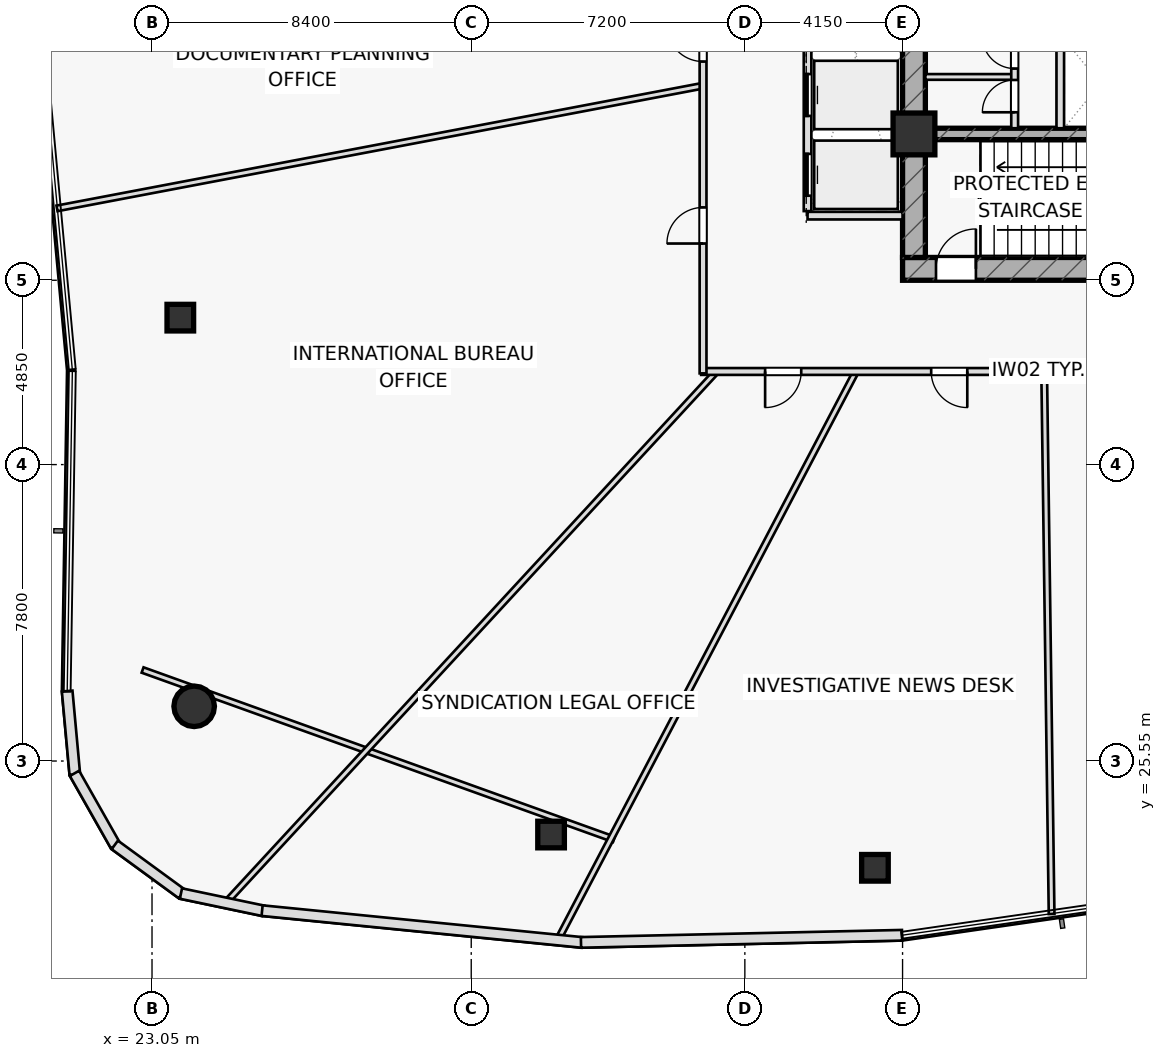
"""IFC4 building model, lengths in metres.
Left out: names, types, materials, properties, quantities, classifications, styles, units other than length and angle.
Written with IfcOpenShell. Run it as: python <this file> out.ifc"""

import sys

from ifc_helpers import new_model, si_unit, direction, frame, frame_2d, origin, origin_2d, place, context, subcontext, project, spatial, rectangle, hollow_rectangle, hollow_circle, extrude, element, fill, save


model = new_model("IFC4")
c1 = context("Model", 3, precision=1e-05, world=origin(), true_north=direction((0.0, 1.0)))
c2 = subcontext(c1, "Body", "Model", "MODEL_VIEW")
j1 = project(units=[si_unit("LENGTHUNIT", "METRE"), si_unit("PLANEANGLEUNIT", "RADIAN")], contexts=[c1])
p1 = place(None, origin())
s1 = spatial("IfcSite", under=j1, at=p1, CompositionType="ELEMENT")
p2 = place(p1, origin())
s2 = spatial("IfcBuilding", under=s1, at=p2, CompositionType="ELEMENT")
p3 = place(p2, frame((0.0, 0.0, 74.4)))
s3 = spatial("IfcBuildingStorey", under=s2, at=p3, CompositionType="ELEMENT", Elevation=74.4)
p4 = place(p3, frame((42.8, 38.5, 0.0), z_axis=(0.0, 0.0, 1.0), x_axis=(1.0, 0.0, 0.0)))
e1 = element("IfcWall", 1, at=p4, inside=s3, PredefinedType="SHEAR", context=c2, shape_type="SweptSolid", body=[
    extrude(rectangle(XDim=14.4, YDim=0.6, at=frame_2d((7.2, 0.0))), origin(), (0.0, 0.0, 1.0), 3.6),
])
p5 = place(p4, frame((0.88, 0.0, 0.0)))
e2 = element("IfcOpeningElement", 2, at=p5, cuts=e1, PredefinedType="OPENING", context=c2, shape_type="SweptSolid", body=[
    extrude(rectangle(XDim=1.05, YDim=2.2, at=frame_2d((0.525, 1.1))), frame((0.0, 0.31, 0.0), z_axis=(0.0, -1.0, 0.0), x_axis=(1.0, 0.0, 0.0)), (0.0, 0.0, 1.0), 0.62),
])
p6 = place(p3, frame((43.1, 38.8, 0.0), z_axis=(0.0, 0.0, 1.0), x_axis=(0.0, 1.0, 0.0)))
e3 = element("IfcWall", 3, at=p6, inside=s3, PredefinedType="SHEAR", context=c2, shape_type="SweptSolid", body=[
    extrude(rectangle(XDim=12.4, YDim=0.6, at=frame_2d((6.2, 0.0))), origin(), (0.0, 0.0, 1.0), 3.6),
])
p7 = place(p3, frame((43.4, 42.05, 0.0), z_axis=(0.0, 0.0, 1.0), x_axis=(1.0, 0.0, 0.0)))
e4 = element("IfcWall", 4, at=p7, inside=s3, PredefinedType="SHEAR", context=c2, shape_type="SweptSolid", body=[
    extrude(rectangle(XDim=13.2, YDim=0.3, at=frame_2d((6.6, 0.0))), origin(), (0.0, 0.0, 1.0), 3.6),
])
p8 = place(p3, frame((43.1, 42.05, 0.0), z_axis=(0.0, 0.0, 1.0), x_axis=(1.0, 0.0, 0.0)))
e5 = element("IfcColumn", 5, at=p8, inside=s3, PredefinedType="COLUMN", context=c2, shape_type="SweptSolid", body=[
    extrude(rectangle(XDim=1.1, YDim=1.1, at=origin_2d()), origin(), (0.0, 0.0, 1.0), 3.6),
])
p9 = place(p3, frame((23.795, 37.216, 0.0), z_axis=(0.0, 0.0, 1.0), x_axis=(1.0, 0.0, 0.0)))
e6 = element("IfcColumn", 6, at=p9, inside=s3, PredefinedType="COLUMN", context=c2, shape_type="SweptSolid", body=[
    extrude(hollow_rectangle(XDim=0.7, YDim=0.7, WallThickness=0.04, at=origin_2d()), origin(), (0.0, 0.0, 1.0), 3.6),
])
p10 = place(p3, frame((24.159, 26.99, 0.0), z_axis=(0.0, 0.0, 1.0), x_axis=(1.0, 0.0, 0.0)))
e7 = element("IfcColumn", 7, at=p10, inside=s3, PredefinedType="COLUMN", context=c2, shape_type="SweptSolid", body=[
    extrude(hollow_circle(Radius=0.533, WallThickness=0.045, at=origin_2d()), origin(), (0.0, 0.0, 1.0), 3.6),
])
for number, where, z_axis, x_axis in (
    (8, (33.551, 23.615, 0.0), (0.0, 0.0, 1.0), (1.0, 0.0, 0.0)),
    (9, (42.073, 22.74, 0.0), (0.0, 0.0, 1.0), (1.0, 0.0, 0.0)),
):
    element("IfcColumn", number, at=place(p3, frame(where, z_axis=z_axis, x_axis=x_axis)), inside=s3, PredefinedType="COLUMN", context=c2, shape_type="SweptSolid", body=[
        extrude(hollow_rectangle(XDim=0.7, YDim=0.7, WallThickness=0.04, at=origin_2d()), origin(), (0.0, 0.0, 1.0), 3.6),
    ])
p11 = place(p3, frame((40.3, 39.9, 0.0), z_axis=(0.0, 0.0, 1.0), x_axis=(1.0, 0.0, 0.0)))
e10 = element("IfcWall", 10, at=p11, inside=s3, PredefinedType="PARTITIONING", context=c2, shape_type="SweptSolid", body=[
    extrude(rectangle(XDim=2.5, YDim=0.2, at=frame_2d((1.25, 0.0))), origin(), (0.0, 0.0, 1.0), 3.6),
])
p12 = place(p3, frame((46.95, 42.2, 0.0), z_axis=(0.0, 0.0, 1.0), x_axis=(0.0, 1.0, 0.0)))
e11 = element("IfcWall", 11, at=p12, inside=s3, PredefinedType="PARTITIONING", context=c2, shape_type="SweptSolid", body=[
    extrude(rectangle(XDim=2.4, YDim=0.2, at=frame_2d((1.2, 0.0))), origin(), (0.0, 0.0, 1.0), 3.6),
])
p13 = place(p3, frame((43.4, 43.55, 0.0), z_axis=(0.0, 0.0, 1.0), x_axis=(1.0, 0.0, 0.0)))
e12 = element("IfcWall", 12, at=p13, inside=s3, PredefinedType="PARTITIONING", context=c2, shape_type="SweptSolid", body=[
    extrude(rectangle(XDim=2.35, YDim=0.15, at=frame_2d((1.175, 0.0))), origin(), (0.0, 0.0, 1.0), 3.6),
])
p14 = place(p3, frame((45.75, 42.2, 0.0), z_axis=(0.0, 0.0, 1.0), x_axis=(0.0, 1.0, 0.0)))
e13 = element("IfcWall", 13, at=p14, inside=s3, PredefinedType="PARTITIONING", context=c2, shape_type="SweptSolid", body=[
    extrude(rectangle(XDim=5.6, YDim=0.18, at=frame_2d((2.8, 0.0))), origin(), (0.0, 0.0, 1.0), 3.6),
])
p15 = place(p14, frame((0.42, 0.0, 0.0)))
e14 = element("IfcOpeningElement", 14, at=p15, cuts=e13, PredefinedType="OPENING", context=c2, shape_type="SweptSolid", body=[
    extrude(rectangle(XDim=0.85, YDim=2.05, at=frame_2d((0.425, 1.025))), frame((0.0, 0.1, 0.0), z_axis=(0.0, -1.0, 0.0), x_axis=(1.0, 0.0, 0.0)), (0.0, 0.0, 1.0), 0.2),
])
p16 = place(p14, frame((1.57, 0.0, 0.0)))
e15 = element("IfcOpeningElement", 15, at=p16, cuts=e13, PredefinedType="OPENING", context=c2, shape_type="SweptSolid", body=[
    extrude(rectangle(XDim=0.85, YDim=2.05, at=frame_2d((0.425, 1.025))), frame((0.0, 0.1, 0.0), z_axis=(0.0, -1.0, 0.0), x_axis=(1.0, 0.0, 0.0)), (0.0, 0.0, 1.0), 0.2),
])
p17 = place(p14, frame((2.8, 0.0, 0.0)))
e16 = element("IfcOpeningElement", 16, at=p17, cuts=e13, PredefinedType="OPENING", context=c2, shape_type="SweptSolid", body=[
    extrude(rectangle(XDim=0.9, YDim=2.05, at=frame_2d((0.45, 1.025))), frame((0.0, 0.1, 0.0), z_axis=(0.0, -1.0, 0.0), x_axis=(1.0, 0.0, 0.0)), (0.0, 0.0, 1.0), 0.2),
])
p18 = place(p3, frame((22.802, 27.945, 0.0), z_axis=(0.0, 0.0, 1.0), x_axis=(0.941102349209, -0.338121824662, 0.0)))
e17 = element("IfcWall", 17, at=p18, inside=s3, PredefinedType="PARTITIONING", context=c2, shape_type="SweptSolid", body=[
    extrude(rectangle(XDim=13.18, YDim=0.15, at=frame_2d((6.59, 0.0))), origin(), (0.0, 0.0, 1.0), 2.975),
])
p19 = place(p3, frame((37.55, 43.319, 0.0), z_axis=(0.0, 0.0, 1.0), x_axis=(-0.98244116135, -0.186572678831, 0.0)))
e18 = element("IfcWall", 18, at=p19, inside=s3, PredefinedType="PARTITIONING", context=c2, shape_type="SweptSolid", body=[
    extrude(rectangle(XDim=17.304, YDim=0.15, at=frame_2d((8.652, 0.0))), origin(), (0.0, 0.0, 1.0), 3.025),
])
p20 = place(p3, frame((37.903, 35.8, 0.0), z_axis=(0.0, 0.0, 1.0), x_axis=(-0.678485038422, -0.73461422028, 0.0)))
e19 = element("IfcWall", 19, at=p20, inside=s3, PredefinedType="PARTITIONING", context=c2, shape_type="SweptSolid", body=[
    extrude(rectangle(XDim=19.047, YDim=0.15, at=frame_2d((9.523, 0.0))), origin(), (0.0, 0.0, 1.0), 2.975),
])
p21 = place(p3, frame((41.575, 35.8, 0.0), z_axis=(0.0, 0.0, 1.0), x_axis=(-0.464501273873, -0.885572451339, 0.0)))
e20 = element("IfcWall", 20, at=p21, inside=s3, PredefinedType="PARTITIONING", context=c2, shape_type="SweptSolid", body=[
    extrude(rectangle(XDim=16.904, YDim=0.15, at=frame_2d((8.452, 0.0))), origin(), (0.0, 0.0, 1.0), 2.975),
])
p22 = place(p3, frame((46.526, 35.8, 0.0), z_axis=(0.0, 0.0, 1.0), x_axis=(0.013697579238, -0.999906183761, 0.0)))
e21 = element("IfcWall", 21, at=p22, inside=s3, PredefinedType="PARTITIONING", context=c2, shape_type="SweptSolid", body=[
    extrude(rectangle(XDim=14.277, YDim=0.15, at=frame_2d((7.138, 0.0))), origin(), (0.0, 0.0, 1.0), 2.975),
])
p23 = place(p3, frame((59.65, 35.8, 0.0), z_axis=(0.0, 0.0, 1.0), x_axis=(-1.0, 0.0, 0.0)))
e22 = element("IfcWall", 22, at=p23, inside=s3, PredefinedType="PARTITIONING", context=c2, shape_type="SweptSolid", body=[
    extrude(rectangle(XDim=22.15, YDim=0.18, at=frame_2d((11.075, 0.0))), origin(), (0.0, 0.0, 1.0), 2.975),
])
p24 = place(p23, frame((1.911, 0.0, 0.0)))
e23 = element("IfcOpeningElement", 23, at=p24, cuts=e22, PredefinedType="OPENING", context=c2, shape_type="SweptSolid", body=[
    extrude(rectangle(XDim=0.95, YDim=2.05, at=frame_2d((0.475, 1.025))), frame((0.0, 0.1, 0.0), z_axis=(0.0, -1.0, 0.0), x_axis=(1.0, 0.0, 0.0)), (0.0, 0.0, 1.0), 0.2),
])
p25 = place(p23, frame((8.314, 0.0, 0.0)))
e24 = element("IfcOpeningElement", 24, at=p25, cuts=e22, PredefinedType="OPENING", context=c2, shape_type="SweptSolid", body=[
    extrude(rectangle(XDim=0.95, YDim=2.05, at=frame_2d((0.475, 1.025))), frame((0.0, 0.1, 0.0), z_axis=(0.0, -1.0, 0.0), x_axis=(1.0, 0.0, 0.0)), (0.0, 0.0, 1.0), 0.2),
])
p26 = place(p23, frame((15.147, 0.0, 0.0)))
e25 = element("IfcOpeningElement", 25, at=p26, cuts=e22, PredefinedType="OPENING", context=c2, shape_type="SweptSolid", body=[
    extrude(rectangle(XDim=0.95, YDim=2.05, at=frame_2d((0.475, 1.025))), frame((0.0, 0.1, 0.0), z_axis=(0.0, -1.0, 0.0), x_axis=(1.0, 0.0, 0.0)), (0.0, 0.0, 1.0), 0.2),
])
p27 = place(p23, frame((19.517, 0.0, 0.0)))
e26 = element("IfcOpeningElement", 26, at=p27, cuts=e22, PredefinedType="OPENING", context=c2, shape_type="SweptSolid", body=[
    extrude(rectangle(XDim=0.95, YDim=2.05, at=frame_2d((0.475, 1.025))), frame((0.0, 0.1, 0.0), z_axis=(0.0, -1.0, 0.0), x_axis=(1.0, 0.0, 0.0)), (0.0, 0.0, 1.0), 0.2),
])
p28 = place(p3, frame((37.55, 35.75, 0.0), z_axis=(0.0, 0.0, 1.0), x_axis=(0.0, 1.0, 0.0)))
e27 = element("IfcWall", 27, at=p28, inside=s3, PredefinedType="PARTITIONING", context=c2, shape_type="SweptSolid", body=[
    extrude(rectangle(XDim=12.75, YDim=0.18, at=frame_2d((6.375, 0.0))), origin(), (0.0, 0.0, 1.0), 2.975),
])
p29 = place(p28, frame((3.417, 0.0, 0.0)))
e28 = element("IfcOpeningElement", 28, at=p29, cuts=e27, PredefinedType="OPENING", context=c2, shape_type="SweptSolid", body=[
    extrude(rectangle(XDim=0.95, YDim=2.05, at=frame_2d((0.475, 1.025))), frame((0.0, 0.1, 0.0), z_axis=(0.0, -1.0, 0.0), x_axis=(1.0, 0.0, 0.0)), (0.0, 0.0, 1.0), 0.2),
])
p30 = place(p28, frame((8.205, 0.0, 0.0)))
e29 = element("IfcOpeningElement", 29, at=p30, cuts=e27, PredefinedType="OPENING", context=c2, shape_type="SweptSolid", body=[
    extrude(rectangle(XDim=0.95, YDim=2.05, at=frame_2d((0.475, 1.025))), frame((0.0, 0.1, 0.0), z_axis=(0.0, -1.0, 0.0), x_axis=(1.0, 0.0, 0.0)), (0.0, 0.0, 1.0), 0.2),
])
p31 = place(p28, frame((10.687, 0.0, 0.0)))
e30 = element("IfcOpeningElement", 30, at=p31, cuts=e27, PredefinedType="OPENING", context=c2, shape_type="SweptSolid", body=[
    extrude(rectangle(XDim=0.95, YDim=2.05, at=frame_2d((0.475, 1.025))), frame((0.0, 0.1, 0.0), z_axis=(0.0, -1.0, 0.0), x_axis=(1.0, 0.0, 0.0)), (0.0, 0.0, 1.0), 0.2),
])
p32 = place(p3, frame((20.817, 27.389, 0.0), z_axis=(0.0, 0.0, 1.0), x_axis=(0.091505764199, -0.995804546645, 0.0)))
e31 = element("IfcWall", 31, at=p32, inside=s3, PredefinedType="STANDARD", context=c2, shape_type="SweptSolid", body=[
    extrude(rectangle(XDim=2.201, YDim=0.28, at=frame_2d((1.101, 0.0))), origin(), (0.0, 0.0, 1.0), 3.6),
])
for number, where, z_axis, x_axis in (
    (32, (21.01, 25.226, 0.0), (0.0, 0.0, 1.0), (0.493, -0.87, 0.0)),
    (33, (22.07, 23.343, 0.0), (0.0, 0.0, 1.0), (0.808, -0.59, 0.0)),
):
    element("IfcWall", number, at=place(p3, frame(where, z_axis=z_axis, x_axis=x_axis)), inside=s3, PredefinedType="STANDARD", context=c2, shape_type="SweptSolid", body=[
        extrude(rectangle(XDim=2.189, YDim=0.28, at=frame_2d((1.095, 0.0))), origin(), (0.0, 0.0, 1.0), 3.6),
    ])
p33 = place(p3, frame((23.812, 22.063, 0.0), z_axis=(0.0, 0.0, 1.0), x_axis=(0.978677243355, -0.205404122012, 0.0)))
e34 = element("IfcWall", 34, at=p33, inside=s3, PredefinedType="STANDARD", context=c2, shape_type="SweptSolid", body=[
    extrude(rectangle(XDim=2.212, YDim=0.28, at=frame_2d((1.106, 0.0))), origin(), (0.0, 0.0, 1.0), 3.6),
])
p34 = place(p3, frame((25.947, 21.614, 0.0), z_axis=(0.0, 0.0, 1.0), x_axis=(0.995097844746, -0.098895295039, 0.0)))
e35 = element("IfcWall", 35, at=p34, inside=s3, PredefinedType="STANDARD", context=c2, shape_type="SweptSolid", body=[
    extrude(rectangle(XDim=8.463, YDim=0.28, at=frame_2d((4.231, 0.0))), origin(), (0.0, 0.0, 1.0), 3.6),
])
p35 = place(p3, frame((34.338, 20.778, 0.0), z_axis=(0.0, 0.0, 1.0), x_axis=(0.999752550019, 0.022244970916, 0.0)))
e36 = element("IfcWall", 36, at=p35, inside=s3, PredefinedType="STANDARD", context=c2, shape_type="SweptSolid", body=[
    extrude(rectangle(XDim=8.451, YDim=0.28, at=frame_2d((4.226, 0.0))), origin(), (0.0, 0.0, 1.0), 3.6),
])
p36 = place(p3, frame((40.3, 40.02, 0.0), z_axis=(0.0, 0.0, 1.0), x_axis=(0.0, 1.0, 0.0)))
e37 = element("IfcWall", 37, at=p36, inside=s3, PredefinedType="PARTITIONING", context=c2, shape_type="SweptSolid", body=[
    extrude(rectangle(XDim=8.21, YDim=0.2, at=frame_2d((4.105, 0.0))), origin(), (0.0, 0.0, 1.0), 3.6),
])
p37 = place(p36, frame((0.405, 0.0, 0.0)))
e38 = element("IfcOpeningElement", 38, at=p37, cuts=e37, PredefinedType="OPENING", context=c2, shape_type="SweptSolid", body=[
    extrude(rectangle(XDim=1.1, YDim=2.15, at=frame_2d((0.55, 1.075))), frame((0.0, 0.11, 0.0), z_axis=(0.0, -1.0, 0.0), x_axis=(1.0, 0.0, 0.0)), (0.0, 0.0, 1.0), 0.22),
])
p38 = place(p36, frame((2.505, 0.0, 0.0)))
e39 = element("IfcOpeningElement", 39, at=p38, cuts=e37, PredefinedType="OPENING", context=c2, shape_type="SweptSolid", body=[
    extrude(rectangle(XDim=1.1, YDim=2.15, at=frame_2d((0.55, 1.075))), frame((0.0, 0.11, 0.0), z_axis=(0.0, -1.0, 0.0), x_axis=(1.0, 0.0, 0.0)), (0.0, 0.0, 1.0), 0.22),
])
p39 = place(p36, frame((4.605, 0.0, 0.0)))
e40 = element("IfcOpeningElement", 40, at=p39, cuts=e37, PredefinedType="OPENING", context=c2, shape_type="SweptSolid", body=[
    extrude(rectangle(XDim=1.1, YDim=2.15, at=frame_2d((0.55, 1.075))), frame((0.0, 0.11, 0.0), z_axis=(0.0, -1.0, 0.0), x_axis=(1.0, 0.0, 0.0)), (0.0, 0.0, 1.0), 0.22),
])
p40 = place(p36, frame((6.705, 0.0, 0.0)))
e41 = element("IfcOpeningElement", 41, at=p40, cuts=e37, PredefinedType="OPENING", context=c2, shape_type="SweptSolid", body=[
    extrude(rectangle(XDim=1.1, YDim=2.15, at=frame_2d((0.55, 1.075))), frame((0.0, 0.11, 0.0), z_axis=(0.0, -1.0, 0.0), x_axis=(1.0, 0.0, 0.0)), (0.0, 0.0, 1.0), 0.22),
])
p41 = place(p5, origin())
e42 = element("IfcDoor", 42, at=p41, inside=s3, OperationType="SINGLE_SWING_RIGHT", PredefinedType="DOOR", context=c2, shape_type="SweptSolid", body=[
    extrude(rectangle(XDim=1.05, YDim=2.2, at=frame_2d((0.525, 1.1))), frame((0.0, 0.025, 0.0), z_axis=(0.0, -1.0, 0.0), x_axis=(1.0, 0.0, 0.0)), (0.0, 0.0, 1.0), 0.05),
])
fill(e2, e42)
p42 = place(p15, origin())
e43 = element("IfcDoor", 43, at=p42, inside=s3, OperationType="SINGLE_SWING_LEFT", PredefinedType="DOOR", context=c2, shape_type="SweptSolid", body=[
    extrude(rectangle(XDim=0.85, YDim=2.05, at=frame_2d((0.425, 1.025))), frame((0.0, 0.025, 0.0), z_axis=(0.0, -1.0, 0.0), x_axis=(1.0, 0.0, 0.0)), (0.0, 0.0, 1.0), 0.05),
])
fill(e14, e43)
p43 = place(p16, origin())
e44 = element("IfcDoor", 44, at=p43, inside=s3, OperationType="SINGLE_SWING_RIGHT", PredefinedType="DOOR", context=c2, shape_type="SweptSolid", body=[
    extrude(rectangle(XDim=0.85, YDim=2.05, at=frame_2d((0.425, 1.025))), frame((0.0, 0.025, 0.0), z_axis=(0.0, -1.0, 0.0), x_axis=(1.0, 0.0, 0.0)), (0.0, 0.0, 1.0), 0.05),
])
fill(e15, e44)
p44 = place(p26, origin())
e45 = element("IfcDoor", 45, at=p44, inside=s3, OperationType="SINGLE_SWING_LEFT", PredefinedType="DOOR", context=c2, shape_type="SweptSolid", body=[
    extrude(rectangle(XDim=0.95, YDim=2.05, at=frame_2d((0.475, 1.025))), frame((0.0, 0.025, 0.0), z_axis=(0.0, -1.0, 0.0), x_axis=(1.0, 0.0, 0.0)), (0.0, 0.0, 1.0), 0.05),
])
fill(e25, e45)
p45 = place(p27, origin())
e46 = element("IfcDoor", 46, at=p45, inside=s3, OperationType="SINGLE_SWING_RIGHT", PredefinedType="DOOR", context=c2, shape_type="SweptSolid", body=[
    extrude(rectangle(XDim=0.95, YDim=2.05, at=frame_2d((0.475, 1.025))), frame((0.0, 0.025, 0.0), z_axis=(0.0, -1.0, 0.0), x_axis=(1.0, 0.0, 0.0)), (0.0, 0.0, 1.0), 0.05),
])
fill(e26, e46)
p46 = place(p29, origin())
e47 = element("IfcDoor", 47, at=p46, inside=s3, OperationType="SINGLE_SWING_LEFT", PredefinedType="DOOR", context=c2, shape_type="SweptSolid", body=[
    extrude(rectangle(XDim=0.95, YDim=2.05, at=frame_2d((0.475, 1.025))), frame((0.0, 0.025, 0.0), z_axis=(0.0, -1.0, 0.0), x_axis=(1.0, 0.0, 0.0)), (0.0, 0.0, 1.0), 0.05),
])
fill(e28, e47)
p47 = place(p30, origin())
e48 = element("IfcDoor", 48, at=p47, inside=s3, OperationType="SINGLE_SWING_RIGHT", PredefinedType="DOOR", context=c2, shape_type="SweptSolid", body=[
    extrude(rectangle(XDim=0.95, YDim=2.05, at=frame_2d((0.475, 1.025))), frame((0.0, 0.025, 0.0), z_axis=(0.0, -1.0, 0.0), x_axis=(1.0, 0.0, 0.0)), (0.0, 0.0, 1.0), 0.05),
])
fill(e29, e48)
p48 = place(p37, origin())
e49 = element("IfcDoor", 49, at=p48, inside=s3, OperationType="SLIDING_TO_LEFT", PredefinedType="DOOR", context=c2, shape_type="SweptSolid", body=[
    extrude(rectangle(XDim=1.1, YDim=2.15, at=frame_2d((0.55, 1.075))), frame((0.0, 0.025, 0.0), z_axis=(0.0, -1.0, 0.0), x_axis=(1.0, 0.0, 0.0)), (0.0, 0.0, 1.0), 0.05),
])
fill(e38, e49)
p49 = place(p38, origin())
e50 = element("IfcDoor", 50, at=p49, inside=s3, OperationType="SLIDING_TO_RIGHT", PredefinedType="DOOR", context=c2, shape_type="SweptSolid", body=[
    extrude(rectangle(XDim=1.1, YDim=2.15, at=frame_2d((0.55, 1.075))), frame((0.0, 0.025, 0.0), z_axis=(0.0, -1.0, 0.0), x_axis=(1.0, 0.0, 0.0)), (0.0, 0.0, 1.0), 0.05),
])
fill(e39, e50)
save(model, sys.argv[1])
